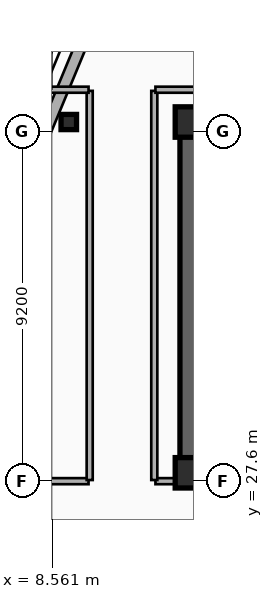
"""IFC4 building model, lengths in metres.
Left out: names, types, materials, properties, quantities, classifications, styles, units other than length and angle.
Written with IfcOpenShell. Run it as: python <this file> out.ifc"""

import sys

from ifc_helpers import new_model, si_unit, direction, frame, frame_2d, origin, origin_2d, place, context, subcontext, project, spatial, rectangle, i_section, extrude, element, save


model = new_model("IFC4")
c1 = context("Model", 3, precision=1e-05, world=origin(), true_north=direction((0.0, 1.0)))
c2 = subcontext(c1, "Body", "Model", "MODEL_VIEW")
j1 = project(units=[si_unit("LENGTHUNIT", "METRE"), si_unit("PLANEANGLEUNIT", "RADIAN")], contexts=[c1])
p1 = place(None, origin())
s1 = spatial("IfcSite", under=j1, at=p1, CompositionType="ELEMENT")
p2 = place(p1, origin())
s2 = spatial("IfcBuilding", under=s1, at=p2, CompositionType="ELEMENT")
p3 = place(p2, frame((0.0, 0.0, 251.0)))
s3 = spatial("IfcBuildingStorey", under=s2, at=p3, CompositionType="ELEMENT", Elevation=251.0)
p4 = place(p3, frame((12.15, 37.05, 0.0), z_axis=(0.0, 0.0, 1.0), x_axis=(1.0, 0.0, 0.0)))
e1 = element("IfcWall", 1, at=p4, inside=s3, PredefinedType="SHEAR", context=c2, shape_type="SweptSolid", body=[
    extrude(rectangle(XDim=33.23, YDim=0.45, at=frame_2d((16.615, 0.0))), origin(), (0.0, 0.0, 1.0), 3.7),
])
p5 = place(p3, frame((21.18, 27.82, 0.0), z_axis=(0.0, 0.0, 1.0), x_axis=(-1.0, 0.0, 0.0)))
e2 = element("IfcWall", 2, at=p5, inside=s3, PredefinedType="SHEAR", context=c2, shape_type="SweptSolid", body=[
    extrude(rectangle(XDim=9.03, YDim=0.45, at=frame_2d((4.515, 0.0))), origin(), (0.0, 0.0, 1.0), 3.7),
])
p6 = place(p5, frame((2.68, 0.0, 0.0)))
e3 = element("IfcOpeningElement", 3, at=p6, cuts=e2, PredefinedType="OPENING", context=c2, shape_type="SweptSolid", body=[
    extrude(rectangle(XDim=1.1, YDim=2.15, at=frame_2d((0.55, 1.075))), frame((0.0, 0.235, 0.0), z_axis=(0.0, -1.0, 0.0), x_axis=(1.0, 0.0, 0.0)), (0.0, 0.0, 1.0), 0.47),
])
p7 = place(p3, frame((12.15, 28.045, 0.0), z_axis=(0.0, 0.0, 1.0), x_axis=(0.0, 1.0, 0.0)))
e4 = element("IfcWall", 4, at=p7, inside=s3, PredefinedType="SHEAR", context=c2, shape_type="SweptSolid", body=[
    extrude(rectangle(XDim=8.78, YDim=0.45, at=frame_2d((4.39, 0.0))), origin(), (0.0, 0.0, 1.0), 3.7),
])
for number, where, z_axis, x_axis in (
    (5, (12.2, 27.82, 0.0), (0.0, 0.0, 1.0), (1.0, 0.0, 0.0)),
    (6, (12.2, 37.05, 0.0), (0.0, 0.0, 1.0), (1.0, 0.0, 0.0)),
):
    element("IfcColumn", number, at=place(p3, frame(where, z_axis=z_axis, x_axis=x_axis)), inside=s3, PredefinedType="COLUMN", context=c2, shape_type="SweptSolid", body=[
        extrude(rectangle(XDim=0.8, YDim=0.8, at=origin_2d()), origin(), (0.0, 0.0, 1.0), 3.7),
    ])
p8 = place(p3, frame((9.0, 37.05, 0.0), z_axis=(0.0, 0.0, 1.0), x_axis=(1.0, 0.0, 0.0)))
e7 = element("IfcColumn", 7, at=p8, inside=s3, PredefinedType="COLUMN", context=c2, shape_type="SweptSolid", body=[
    extrude(i_section(OverallWidth=0.408, OverallDepth=0.4, WebThickness=0.025, FlangeThickness=0.039, FilletRadius=0.015, at=origin_2d()), origin(), (0.0, 0.0, 1.0), 3.7),
])
p9 = place(p3, frame((8.38, 36.8, 0.0), z_axis=(0.0, 0.0, 1.0), x_axis=(0.382704529509, 0.923870793506, 0.0)))
e8 = element("IfcWall", 8, at=p9, inside=s3, PredefinedType="SOLIDWALL", context=c2, shape_type="SweptSolid", body=[
    extrude(rectangle(XDim=3.077, YDim=0.3, at=frame_2d((1.538, 0.0))), origin(), (0.0, 0.0, 1.0), 3.42),
])
p10 = place(p3, frame((8.49, 27.6, 0.0), z_axis=(0.0, 0.0, 1.0), x_axis=(1.0, 0.0, 0.0)))
e9 = element("IfcWall", 9, at=p10, inside=s3, PredefinedType="PARTITIONING", context=c2, shape_type="SweptSolid", body=[
    extrude(rectangle(XDim=1.03, YDim=0.16, at=frame_2d((0.515, 0.0))), origin(), (0.0, 0.0, 1.0), 3.42),
])
p11 = place(p3, frame((11.28, 27.6, 0.0), z_axis=(0.0, 0.0, 1.0), x_axis=(1.0, 0.0, 0.0)))
e10 = element("IfcWall", 10, at=p11, inside=s3, PredefinedType="PARTITIONING", context=c2, shape_type="SweptSolid", body=[
    extrude(rectangle(XDim=0.84, YDim=0.16, at=frame_2d((0.42, 0.0))), origin(), (0.0, 0.0, 1.0), 2.49),
])
for number, where, z_axis, x_axis in (
    (11, (9.55, 27.63, 0.0), (0.0, 0.0, 1.0), (0.0, 1.0, 0.0)),
    (12, (11.25, 27.63, 0.0), (0.0, 0.0, 1.0), (0.0, 1.0, 0.0)),
):
    element("IfcWall", number, at=place(p3, frame(where, z_axis=z_axis, x_axis=x_axis)), inside=s3, PredefinedType="PARTITIONING", context=c2, shape_type="SweptSolid", body=[
        extrude(rectangle(XDim=10.24, YDim=0.16, at=frame_2d((5.12, 0.0))), origin(), (0.0, 0.0, 1.0), 2.9),
    ])
p12 = place(p3, frame((8.49, 37.9, 0.0), z_axis=(0.0, 0.0, 1.0), x_axis=(1.0, 0.0, 0.0)))
e13 = element("IfcWall", 13, at=p12, inside=s3, PredefinedType="PARTITIONING", context=c2, shape_type="SweptSolid", body=[
    extrude(rectangle(XDim=1.03, YDim=0.16, at=frame_2d((0.515, 0.0))), origin(), (0.0, 0.0, 1.0), 3.42),
])
p13 = place(p3, frame((11.28, 37.9, 0.0), z_axis=(0.0, 0.0, 1.0), x_axis=(1.0, 0.0, 0.0)))
e14 = element("IfcWall", 14, at=p13, inside=s3, PredefinedType="PARTITIONING", context=c2, shape_type="SweptSolid", body=[
    extrude(rectangle(XDim=35.04, YDim=0.16, at=frame_2d((17.52, 0.0))), origin(), (0.0, 0.0, 1.0), 3.42),
])
save(model, sys.argv[1])
